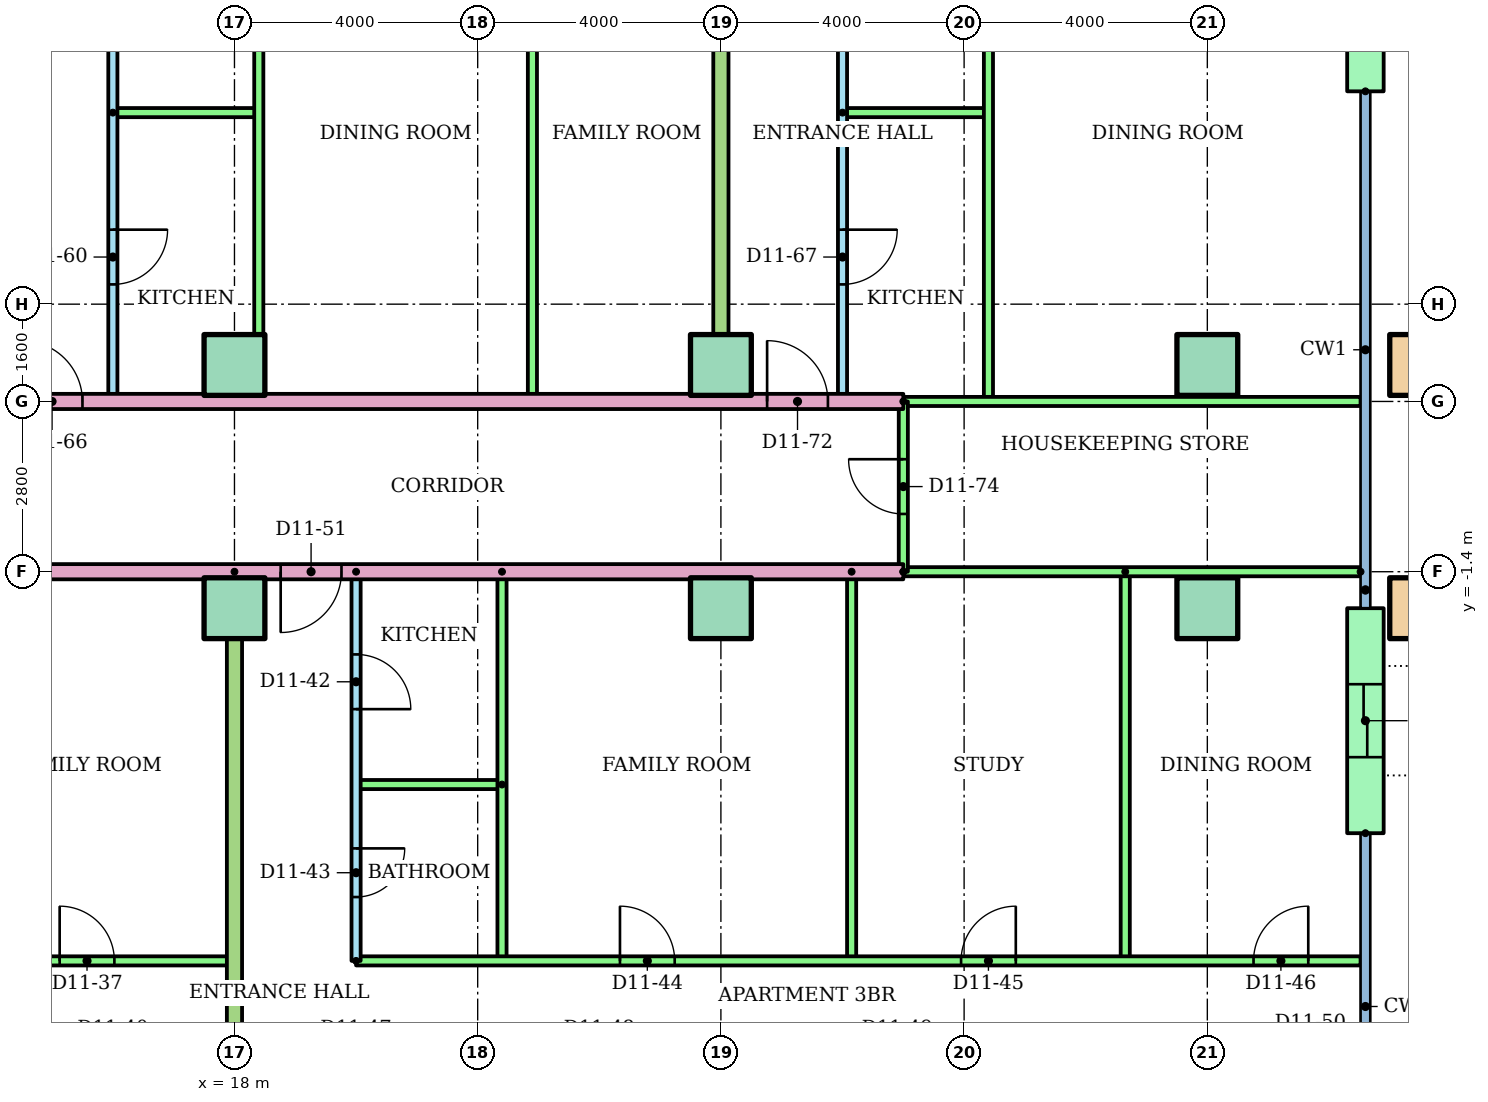
"""IFC4 building model, lengths in metres.
Left out: names, types, materials, properties, quantities, classifications, styles, units other than length and angle.
Written with IfcOpenShell. Run it as: python <this file> out.ifc"""

import sys

from ifc_helpers import new_model, si_unit, direction, frame, frame_2d, origin, origin_2d, place, context, subcontext, project, spatial, rectangle, hollow_rectangle, extrude, element, fill, save


model = new_model("IFC4")
c1 = context("Model", 3, precision=1e-05, world=origin(), true_north=direction((0.0, 1.0)))
c2 = subcontext(c1, "Body", "Model", "MODEL_VIEW")
j1 = project(units=[si_unit("LENGTHUNIT", "METRE"), si_unit("PLANEANGLEUNIT", "RADIAN")], contexts=[c1])
p1 = place(None, origin())
s1 = spatial("IfcSite", under=j1, at=p1, CompositionType="ELEMENT")
p2 = place(p1, origin())
s2 = spatial("IfcBuilding", under=s1, at=p2, CompositionType="ELEMENT")
p3 = place(p2, frame((0.0, 0.0, 44.8)))
s3 = spatial("IfcBuildingStorey", under=s2, at=p3, CompositionType="ELEMENT", Elevation=44.8)
for number, where in (
    (1, (18.0, -2.0, 0.0)),
    (2, (26.0, -2.0, 0.0)),
    (3, (34.0, -2.0, 0.0)),
):
    element("IfcColumn", number, at=place(p3, frame(where)), inside=s3, PredefinedType="COLUMN", context=c2, shape_type="SweptSolid", body=[
        extrude(rectangle(XDim=1.0, YDim=1.0, at=origin_2d()), origin(), (0.0, 0.0, 1.0), 3.2),
    ])
p4 = place(p3, frame((37.5, -2.0, 0.0)))
e4 = element("IfcColumn", 4, at=p4, inside=s3, PredefinedType="COLUMN", context=c2, shape_type="SweptSolid", body=[
    extrude(hollow_rectangle(XDim=1.0, YDim=1.0, WallThickness=0.05, at=origin_2d()), origin(), (0.0, 0.0, 1.0), 3.2),
])
for number, where in (
    (5, (18.0, 2.0, 0.0)),
    (6, (26.0, 2.0, 0.0)),
    (7, (34.0, 2.0, 0.0)),
):
    element("IfcColumn", number, at=place(p3, frame(where)), inside=s3, PredefinedType="COLUMN", context=c2, shape_type="SweptSolid", body=[
        extrude(rectangle(XDim=1.0, YDim=1.0, at=origin_2d()), origin(), (0.0, 0.0, 1.0), 3.2),
    ])
p5 = place(p3, frame((37.5, 2.0, 0.0)))
e8 = element("IfcColumn", 8, at=p5, inside=s3, PredefinedType="COLUMN", context=c2, shape_type="SweptSolid", body=[
    extrude(hollow_rectangle(XDim=1.0, YDim=1.0, WallThickness=0.05, at=origin_2d()), origin(), (0.0, 0.0, 1.0), 3.2),
])
p6 = place(p3, frame((36.6, -5.7, 0.0), z_axis=(0.0, 0.0, 1.0), x_axis=(0.0, 1.0, 0.0)))
e9 = element("IfcWall", 9, at=p6, inside=s3, PredefinedType="STANDARD", context=c2, shape_type="SweptSolid", body=[
    extrude(rectangle(XDim=3.7, YDim=0.6, at=frame_2d((1.85, 0.0))), origin(), (0.0, 0.0, 1.0), 2.92),
])
p7 = place(p6, frame((1.25, 0.0, 0.0)))
e10 = element("IfcOpeningElement", 10, at=p7, cuts=e9, PredefinedType="OPENING", context=c2, shape_type="SweptSolid", body=[
    extrude(rectangle(XDim=1.2, YDim=2.1, at=frame_2d((0.6, 1.05))), frame((0.0, 0.31, 0.0), z_axis=(0.0, -1.0, 0.0), x_axis=(1.0, 0.0, 0.0)), (0.0, 0.0, 1.0), 0.62),
])
p8 = place(p3, frame((36.6, 6.5, 0.0), z_axis=(0.0, 0.0, 1.0), x_axis=(0.0, 1.0, 0.0)))
e11 = element("IfcWall", 11, at=p8, inside=s3, PredefinedType="STANDARD", context=c2, shape_type="SweptSolid", body=[
    extrude(rectangle(XDim=4.5, YDim=0.6, at=frame_2d((2.25, 0.0))), origin(), (0.0, 0.0, 1.0), 2.92),
])
p9 = place(p8, frame((1.65, 0.0, 0.0)))
e12 = element("IfcOpeningElement", 12, at=p9, cuts=e11, PredefinedType="OPENING", context=c2, shape_type="SweptSolid", body=[
    extrude(rectangle(XDim=1.2, YDim=2.1, at=frame_2d((0.6, 1.05))), frame((0.0, 0.31, 0.0), z_axis=(0.0, -1.0, 0.0), x_axis=(1.0, 0.0, 0.0)), (0.0, 0.0, 1.0), 0.62),
])
p10 = place(p3, frame((4.0, -7.8, 0.0)))
e13 = element("IfcWall", 13, at=p10, inside=s3, PredefinedType="PARTITIONING", context=c2, shape_type="SweptSolid", body=[
    extrude(rectangle(XDim=14.0, YDim=0.15, at=frame_2d((7.0, 0.0))), origin(), (0.0, 0.0, 1.0), 2.4),
])
p11 = place(p10, frame((3.45, 0.0, 0.0)))
e14 = element("IfcOpeningElement", 14, at=p11, cuts=e13, PredefinedType="OPENING", context=c2, shape_type="SweptSolid", body=[
    extrude(rectangle(XDim=0.9, YDim=2.1, at=frame_2d((0.45, 1.05))), frame((0.0, 0.085, 0.0), z_axis=(0.0, -1.0, 0.0), x_axis=(1.0, 0.0, 0.0)), (0.0, 0.0, 1.0), 0.17),
])
p12 = place(p10, frame((6.825, 0.0, 0.0)))
e15 = element("IfcOpeningElement", 15, at=p12, cuts=e13, PredefinedType="OPENING", context=c2, shape_type="SweptSolid", body=[
    extrude(rectangle(XDim=0.9, YDim=2.1, at=frame_2d((0.45, 1.05))), frame((0.0, 0.085, 0.0), z_axis=(0.0, -1.0, 0.0), x_axis=(1.0, 0.0, 0.0)), (0.0, 0.0, 1.0), 0.17),
])
p13 = place(p10, frame((11.125, 0.0, 0.0)))
e16 = element("IfcOpeningElement", 16, at=p13, cuts=e13, PredefinedType="OPENING", context=c2, shape_type="SweptSolid", body=[
    extrude(rectangle(XDim=0.9, YDim=2.1, at=frame_2d((0.45, 1.05))), frame((0.0, 0.085, 0.0), z_axis=(0.0, -1.0, 0.0), x_axis=(1.0, 0.0, 0.0)), (0.0, 0.0, 1.0), 0.17),
])
p14 = place(p3, frame((20.0, -1.4, 0.0), z_axis=(0.0, 0.0, 1.0), x_axis=(0.0, -1.0, 0.0)))
e17 = element("IfcWall", 17, at=p14, inside=s3, PredefinedType="PARTITIONING", context=c2, shape_type="SweptSolid", body=[
    extrude(rectangle(XDim=6.4, YDim=0.15, at=frame_2d((3.2, 0.0))), origin(), (0.0, 0.0, 1.0), 2.4),
])
p15 = place(p14, frame((1.36, 0.0, 0.0)))
e18 = element("IfcOpeningElement", 18, at=p15, cuts=e17, PredefinedType="OPENING", context=c2, shape_type="SweptSolid", body=[
    extrude(rectangle(XDim=0.9, YDim=2.1, at=frame_2d((0.45, 1.05))), frame((0.0, 0.085, 0.0), z_axis=(0.0, -1.0, 0.0), x_axis=(1.0, 0.0, 0.0)), (0.0, 0.0, 1.0), 0.17),
])
p16 = place(p14, frame((4.55, 0.0, 0.0)))
e19 = element("IfcOpeningElement", 19, at=p16, cuts=e17, PredefinedType="OPENING", context=c2, shape_type="SweptSolid", body=[
    extrude(rectangle(XDim=0.8, YDim=2.1, at=frame_2d((0.4, 1.05))), frame((0.0, 0.085, 0.0), z_axis=(0.0, -1.0, 0.0), x_axis=(1.0, 0.0, 0.0)), (0.0, 0.0, 1.0), 0.17),
])
p17 = place(p3, frame((22.4, -4.9, 0.0), z_axis=(0.0, 0.0, 1.0), x_axis=(-1.0, 0.0, 0.0)))
e20 = element("IfcWall", 20, at=p17, inside=s3, PredefinedType="PARTITIONING", context=c2, shape_type="SweptSolid", body=[
    extrude(rectangle(XDim=2.4, YDim=0.15, at=frame_2d((1.2, 0.0))), origin(), (0.0, 0.0, 1.0), 2.4),
])
for number, where, z_axis, x_axis in (
    (21, (22.4, -1.4, 0.0), (0.0, 0.0, 1.0), (0.0, -1.0, 0.0)),
    (22, (28.15, -1.4, 0.0), (0.0, 0.0, 1.0), (0.0, -1.0, 0.0)),
    (23, (32.65, -1.4, 0.0), (0.0, 0.0, 1.0), (0.0, -1.0, 0.0)),
):
    element("IfcWall", number, at=place(p3, frame(where, z_axis=z_axis, x_axis=x_axis)), inside=s3, PredefinedType="PARTITIONING", context=c2, shape_type="SweptSolid", body=[
        extrude(rectangle(XDim=6.4, YDim=0.15, at=frame_2d((3.2, 0.0))), origin(), (0.0, 0.0, 1.0), 2.4),
    ])
p18 = place(p3, frame((20.0, -7.8, 0.0)))
e24 = element("IfcWall", 24, at=p18, inside=s3, PredefinedType="PARTITIONING", context=c2, shape_type="SweptSolid", body=[
    extrude(rectangle(XDim=16.52, YDim=0.15, at=frame_2d((8.26, 0.0))), origin(), (0.0, 0.0, 1.0), 2.4),
])
p19 = place(p18, frame((4.34, 0.0, 0.0)))
e25 = element("IfcOpeningElement", 25, at=p19, cuts=e24, PredefinedType="OPENING", context=c2, shape_type="SweptSolid", body=[
    extrude(rectangle(XDim=0.9, YDim=2.1, at=frame_2d((0.45, 1.05))), frame((0.0, 0.085, 0.0), z_axis=(0.0, -1.0, 0.0), x_axis=(1.0, 0.0, 0.0)), (0.0, 0.0, 1.0), 0.17),
])
p20 = place(p18, frame((9.95, 0.0, 0.0)))
e26 = element("IfcOpeningElement", 26, at=p20, cuts=e24, PredefinedType="OPENING", context=c2, shape_type="SweptSolid", body=[
    extrude(rectangle(XDim=0.9, YDim=2.1, at=frame_2d((0.45, 1.05))), frame((0.0, 0.085, 0.0), z_axis=(0.0, -1.0, 0.0), x_axis=(1.0, 0.0, 0.0)), (0.0, 0.0, 1.0), 0.17),
])
p21 = place(p18, frame((14.76, 0.0, 0.0)))
e27 = element("IfcOpeningElement", 27, at=p21, cuts=e24, PredefinedType="OPENING", context=c2, shape_type="SweptSolid", body=[
    extrude(rectangle(XDim=0.9, YDim=2.1, at=frame_2d((0.45, 1.05))), frame((0.0, 0.085, 0.0), z_axis=(0.0, -1.0, 0.0), x_axis=(1.0, 0.0, 0.0)), (0.0, 0.0, 1.0), 0.17),
])
p22 = place(p3, frame((18.0, -1.4, 0.0), z_axis=(0.0, 0.0, 1.0), x_axis=(0.0, -1.0, 0.0)))
e28 = element("IfcWall", 28, at=p22, inside=s3, PredefinedType="PARTITIONING", context=c2, shape_type="SweptSolid", body=[
    extrude(rectangle(XDim=14.71, YDim=0.25, at=frame_2d((7.355, 0.0))), origin(), (0.0, 0.0, 1.0), 2.4),
])
p23 = place(p3, frame((29.0, -1.4, 0.0), z_axis=(0.0, 0.0, 1.0), x_axis=(-1.0, 0.0, 0.0)))
e29 = element("IfcWall", 29, at=p23, inside=s3, PredefinedType="PARTITIONING", context=c2, shape_type="SweptSolid", body=[
    extrude(rectangle(XDim=15.0, YDim=0.25, at=frame_2d((7.5, 0.0))), origin(), (0.0, 0.0, 1.0), 2.4),
])
p24 = place(p23, frame((9.24, 0.0, 0.0)))
e30 = element("IfcOpeningElement", 30, at=p24, cuts=e29, PredefinedType="OPENING", context=c2, shape_type="SweptSolid", body=[
    extrude(rectangle(XDim=1.0, YDim=2.1, at=frame_2d((0.5, 1.05))), frame((0.0, 0.135, 0.0), z_axis=(0.0, -1.0, 0.0), x_axis=(1.0, 0.0, 0.0)), (0.0, 0.0, 1.0), 0.27),
])
p25 = place(p3, frame((36.52, -1.4, 0.0), z_axis=(0.0, 0.0, 1.0), x_axis=(-1.0, 0.0, 0.0)))
e31 = element("IfcWall", 31, at=p25, inside=s3, PredefinedType="PARTITIONING", context=c2, shape_type="SweptSolid", body=[
    extrude(rectangle(XDim=7.52, YDim=0.15, at=frame_2d((3.76, 0.0))), origin(), (0.0, 0.0, 1.0), 2.4),
])
p26 = place(p3, frame((16.0, 10.2, 0.0), z_axis=(0.0, 0.0, 1.0), x_axis=(0.0, -1.0, 0.0)))
e32 = element("IfcWall", 32, at=p26, inside=s3, PredefinedType="PARTITIONING", context=c2, shape_type="SweptSolid", body=[
    extrude(rectangle(XDim=8.8, YDim=0.15, at=frame_2d((4.4, 0.0))), origin(), (0.0, 0.0, 1.0), 2.4),
])
p27 = place(p26, frame((5.975, 0.0, 0.0)))
e33 = element("IfcOpeningElement", 33, at=p27, cuts=e32, PredefinedType="OPENING", context=c2, shape_type="SweptSolid", body=[
    extrude(rectangle(XDim=0.9, YDim=2.1, at=frame_2d((0.45, 1.05))), frame((0.0, 0.085, 0.0), z_axis=(0.0, -1.0, 0.0), x_axis=(1.0, 0.0, 0.0)), (0.0, 0.0, 1.0), 0.17),
])
p28 = place(p26, frame((1.625, 0.0, 0.0)))
e34 = element("IfcOpeningElement", 34, at=p28, cuts=e32, PredefinedType="OPENING", context=c2, shape_type="SweptSolid", body=[
    extrude(rectangle(XDim=0.8, YDim=2.1, at=frame_2d((0.4, 1.05))), frame((0.0, 0.085, 0.0), z_axis=(0.0, -1.0, 0.0), x_axis=(1.0, 0.0, 0.0)), (0.0, 0.0, 1.0), 0.17),
])
p29 = place(p3, frame((16.0, 6.15, 0.0)))
e35 = element("IfcWall", 35, at=p29, inside=s3, PredefinedType="PARTITIONING", context=c2, shape_type="SweptSolid", body=[
    extrude(rectangle(XDim=2.4, YDim=0.15, at=frame_2d((1.2, 0.0))), origin(), (0.0, 0.0, 1.0), 2.4),
])
for number, where, z_axis, x_axis in (
    (36, (18.4, 10.2, 0.0), (0.0, 0.0, 1.0), (0.0, -1.0, 0.0)),
    (37, (22.9, 10.2, 0.0), (0.0, 0.0, 1.0), (0.0, -1.0, 0.0)),
):
    element("IfcWall", number, at=place(p3, frame(where, z_axis=z_axis, x_axis=x_axis)), inside=s3, PredefinedType="PARTITIONING", context=c2, shape_type="SweptSolid", body=[
        extrude(rectangle(XDim=8.8, YDim=0.15, at=frame_2d((4.4, 0.0))), origin(), (0.0, 0.0, 1.0), 2.4),
    ])
p30 = place(p3, frame((28.0, 10.2, 0.0), z_axis=(0.0, 0.0, 1.0), x_axis=(0.0, -1.0, 0.0)))
e38 = element("IfcWall", 38, at=p30, inside=s3, PredefinedType="PARTITIONING", context=c2, shape_type="SweptSolid", body=[
    extrude(rectangle(XDim=8.8, YDim=0.15, at=frame_2d((4.4, 0.0))), origin(), (0.0, 0.0, 1.0), 2.4),
])
p31 = place(p30, frame((5.975, 0.0, 0.0)))
e39 = element("IfcOpeningElement", 39, at=p31, cuts=e38, PredefinedType="OPENING", context=c2, shape_type="SweptSolid", body=[
    extrude(rectangle(XDim=0.9, YDim=2.1, at=frame_2d((0.45, 1.05))), frame((0.0, 0.085, 0.0), z_axis=(0.0, -1.0, 0.0), x_axis=(1.0, 0.0, 0.0)), (0.0, 0.0, 1.0), 0.17),
])
p32 = place(p30, frame((1.625, 0.0, 0.0)))
e40 = element("IfcOpeningElement", 40, at=p32, cuts=e38, PredefinedType="OPENING", context=c2, shape_type="SweptSolid", body=[
    extrude(rectangle(XDim=0.8, YDim=2.1, at=frame_2d((0.4, 1.05))), frame((0.0, 0.085, 0.0), z_axis=(0.0, -1.0, 0.0), x_axis=(1.0, 0.0, 0.0)), (0.0, 0.0, 1.0), 0.17),
])
p33 = place(p3, frame((28.0, 6.15, 0.0)))
e41 = element("IfcWall", 41, at=p33, inside=s3, PredefinedType="PARTITIONING", context=c2, shape_type="SweptSolid", body=[
    extrude(rectangle(XDim=2.4, YDim=0.15, at=frame_2d((1.2, 0.0))), origin(), (0.0, 0.0, 1.0), 2.4),
])
p34 = place(p3, frame((30.4, 10.2, 0.0), z_axis=(0.0, 0.0, 1.0), x_axis=(0.0, -1.0, 0.0)))
e42 = element("IfcWall", 42, at=p34, inside=s3, PredefinedType="PARTITIONING", context=c2, shape_type="SweptSolid", body=[
    extrude(rectangle(XDim=8.8, YDim=0.15, at=frame_2d((4.4, 0.0))), origin(), (0.0, 0.0, 1.0), 2.4),
])
p35 = place(p3, frame((26.0, 18.521, 0.0), z_axis=(0.0, 0.0, 1.0), x_axis=(0.0, -1.0, 0.0)))
e43 = element("IfcWall", 43, at=p35, inside=s3, PredefinedType="PARTITIONING", context=c2, shape_type="SweptSolid", body=[
    extrude(rectangle(XDim=17.121, YDim=0.25, at=frame_2d((8.561, 0.0))), origin(), (0.0, 0.0, 1.0), 2.4),
])
p36 = place(p3, frame((14.0, 1.4, 0.0)))
e44 = element("IfcWall", 44, at=p36, inside=s3, PredefinedType="PARTITIONING", context=c2, shape_type="SweptSolid", body=[
    extrude(rectangle(XDim=15.0, YDim=0.25, at=frame_2d((7.5, 0.0))), origin(), (0.0, 0.0, 1.0), 2.4),
])
p37 = place(p36, frame((0.5, 0.0, 0.0)))
e45 = element("IfcOpeningElement", 45, at=p37, cuts=e44, PredefinedType="OPENING", context=c2, shape_type="SweptSolid", body=[
    extrude(rectangle(XDim=1.0, YDim=2.1, at=frame_2d((0.5, 1.05))), frame((0.0, 0.135, 0.0), z_axis=(0.0, -1.0, 0.0), x_axis=(1.0, 0.0, 0.0)), (0.0, 0.0, 1.0), 0.27),
])
p38 = place(p36, frame((12.76, 0.0, 0.0)))
e46 = element("IfcOpeningElement", 46, at=p38, cuts=e44, PredefinedType="OPENING", context=c2, shape_type="SweptSolid", body=[
    extrude(rectangle(XDim=1.0, YDim=2.1, at=frame_2d((0.5, 1.05))), frame((0.0, 0.135, 0.0), z_axis=(0.0, -1.0, 0.0), x_axis=(1.0, 0.0, 0.0)), (0.0, 0.0, 1.0), 0.27),
])
p39 = place(p3, frame((29.0, 1.4, 0.0)))
e47 = element("IfcWall", 47, at=p39, inside=s3, PredefinedType="PARTITIONING", context=c2, shape_type="SweptSolid", body=[
    extrude(rectangle(XDim=7.52, YDim=0.15, at=frame_2d((3.76, 0.0))), origin(), (0.0, 0.0, 1.0), 2.4),
])
p40 = place(p3, frame((29.0, -1.4, 0.0), z_axis=(0.0, 0.0, 1.0), x_axis=(0.0, 1.0, 0.0)))
e48 = element("IfcWall", 48, at=p40, inside=s3, PredefinedType="PARTITIONING", context=c2, shape_type="SweptSolid", body=[
    extrude(rectangle(XDim=2.8, YDim=0.15, at=frame_2d((1.4, 0.0))), origin(), (0.0, 0.0, 1.0), 2.4),
])
p41 = place(p40, frame((0.95, 0.0, 0.0)))
e49 = element("IfcOpeningElement", 49, at=p41, cuts=e48, PredefinedType="OPENING", context=c2, shape_type="SweptSolid", body=[
    extrude(rectangle(XDim=0.9, YDim=2.1, at=frame_2d((0.45, 1.05))), frame((0.0, 0.085, 0.0), z_axis=(0.0, -1.0, 0.0), x_axis=(1.0, 0.0, 0.0)), (0.0, 0.0, 1.0), 0.17),
])
p42 = place(p13, origin())
e50 = element("IfcDoor", 50, at=p42, inside=s3, OperationType="SINGLE_SWING_LEFT", PredefinedType="DOOR", context=c2, shape_type="SweptSolid", body=[
    extrude(rectangle(XDim=0.9, YDim=2.1, at=frame_2d((0.45, 1.05))), frame((0.0, 0.025, 0.0), z_axis=(0.0, -1.0, 0.0), x_axis=(1.0, 0.0, 0.0)), (0.0, 0.0, 1.0), 0.05),
])
fill(e16, e50)
p43 = place(p15, origin())
e51 = element("IfcDoor", 51, at=p43, inside=s3, OperationType="SINGLE_SWING_RIGHT", PredefinedType="DOOR", context=c2, shape_type="SweptSolid", body=[
    extrude(rectangle(XDim=0.9, YDim=2.1, at=frame_2d((0.45, 1.05))), frame((0.0, 0.025, 0.0), z_axis=(0.0, -1.0, 0.0), x_axis=(1.0, 0.0, 0.0)), (0.0, 0.0, 1.0), 0.05),
])
fill(e18, e51)
p44 = place(p16, origin())
e52 = element("IfcDoor", 52, at=p44, inside=s3, OperationType="SINGLE_SWING_LEFT", PredefinedType="DOOR", context=c2, shape_type="SweptSolid", body=[
    extrude(rectangle(XDim=0.8, YDim=2.1, at=frame_2d((0.4, 1.05))), frame((0.0, 0.025, 0.0), z_axis=(0.0, -1.0, 0.0), x_axis=(1.0, 0.0, 0.0)), (0.0, 0.0, 1.0), 0.05),
])
fill(e19, e52)
p45 = place(p19, origin())
e53 = element("IfcDoor", 53, at=p45, inside=s3, OperationType="SINGLE_SWING_LEFT", PredefinedType="DOOR", context=c2, shape_type="SweptSolid", body=[
    extrude(rectangle(XDim=0.9, YDim=2.1, at=frame_2d((0.45, 1.05))), frame((0.0, 0.025, 0.0), z_axis=(0.0, -1.0, 0.0), x_axis=(1.0, 0.0, 0.0)), (0.0, 0.0, 1.0), 0.05),
])
fill(e25, e53)
p46 = place(p20, origin())
e54 = element("IfcDoor", 54, at=p46, inside=s3, OperationType="SINGLE_SWING_RIGHT", PredefinedType="DOOR", context=c2, shape_type="SweptSolid", body=[
    extrude(rectangle(XDim=0.9, YDim=2.1, at=frame_2d((0.45, 1.05))), frame((0.0, 0.025, 0.0), z_axis=(0.0, -1.0, 0.0), x_axis=(1.0, 0.0, 0.0)), (0.0, 0.0, 1.0), 0.05),
])
fill(e26, e54)
p47 = place(p21, origin())
e55 = element("IfcDoor", 55, at=p47, inside=s3, OperationType="SINGLE_SWING_RIGHT", PredefinedType="DOOR", context=c2, shape_type="SweptSolid", body=[
    extrude(rectangle(XDim=0.9, YDim=2.1, at=frame_2d((0.45, 1.05))), frame((0.0, 0.025, 0.0), z_axis=(0.0, -1.0, 0.0), x_axis=(1.0, 0.0, 0.0)), (0.0, 0.0, 1.0), 0.05),
])
fill(e27, e55)
p48 = place(p24, origin())
e56 = element("IfcDoor", 56, at=p48, inside=s3, OperationType="SINGLE_SWING_RIGHT", PredefinedType="DOOR", context=c2, shape_type="SweptSolid", body=[
    extrude(rectangle(XDim=1.0, YDim=2.1, at=frame_2d((0.5, 1.05))), frame((0.0, 0.025, 0.0), z_axis=(0.0, -1.0, 0.0), x_axis=(1.0, 0.0, 0.0)), (0.0, 0.0, 1.0), 0.05),
])
fill(e30, e56)
p49 = place(p27, origin())
e57 = element("IfcDoor", 57, at=p49, inside=s3, OperationType="SINGLE_SWING_LEFT", PredefinedType="DOOR", context=c2, shape_type="SweptSolid", body=[
    extrude(rectangle(XDim=0.9, YDim=2.1, at=frame_2d((0.45, 1.05))), frame((0.0, 0.025, 0.0), z_axis=(0.0, -1.0, 0.0), x_axis=(1.0, 0.0, 0.0)), (0.0, 0.0, 1.0), 0.05),
])
fill(e33, e57)
p50 = place(p37, origin())
e58 = element("IfcDoor", 58, at=p50, inside=s3, OperationType="SINGLE_SWING_LEFT", PredefinedType="DOOR", context=c2, shape_type="SweptSolid", body=[
    extrude(rectangle(XDim=1.0, YDim=2.1, at=frame_2d((0.5, 1.05))), frame((0.0, 0.025, 0.0), z_axis=(0.0, -1.0, 0.0), x_axis=(1.0, 0.0, 0.0)), (0.0, 0.0, 1.0), 0.05),
])
fill(e45, e58)
p51 = place(p31, origin())
e59 = element("IfcDoor", 59, at=p51, inside=s3, OperationType="SINGLE_SWING_LEFT", PredefinedType="DOOR", context=c2, shape_type="SweptSolid", body=[
    extrude(rectangle(XDim=0.9, YDim=2.1, at=frame_2d((0.45, 1.05))), frame((0.0, 0.025, 0.0), z_axis=(0.0, -1.0, 0.0), x_axis=(1.0, 0.0, 0.0)), (0.0, 0.0, 1.0), 0.05),
])
fill(e39, e59)
p52 = place(p38, origin())
e60 = element("IfcDoor", 60, at=p52, inside=s3, OperationType="SINGLE_SWING_LEFT", PredefinedType="DOOR", context=c2, shape_type="SweptSolid", body=[
    extrude(rectangle(XDim=1.0, YDim=2.1, at=frame_2d((0.5, 1.05))), frame((0.0, 0.025, 0.0), z_axis=(0.0, -1.0, 0.0), x_axis=(1.0, 0.0, 0.0)), (0.0, 0.0, 1.0), 0.05),
])
fill(e46, e60)
p53 = place(p41, origin())
e61 = element("IfcDoor", 61, at=p53, inside=s3, OperationType="SINGLE_SWING_RIGHT", PredefinedType="DOOR", context=c2, shape_type="SweptSolid", body=[
    extrude(rectangle(XDim=0.9, YDim=2.1, at=frame_2d((0.45, 1.05))), frame((0.0, 0.025, 0.0), z_axis=(0.0, -1.0, 0.0), x_axis=(1.0, 0.0, 0.0)), (0.0, 0.0, 1.0), 0.05),
])
fill(e49, e61)
p54 = place(p7, origin())
e62 = element("IfcDoor", 62, at=p54, inside=s3, OperationType="SLIDING_TO_LEFT", PredefinedType="DOOR", context=c2, shape_type="SweptSolid", body=[
    extrude(rectangle(XDim=1.2, YDim=2.1, at=frame_2d((0.6, 1.05))), frame((0.0, 0.025, 0.0), z_axis=(0.0, -1.0, 0.0), x_axis=(1.0, 0.0, 0.0)), (0.0, 0.0, 1.0), 0.05),
])
fill(e10, e62)
save(model, sys.argv[1])
